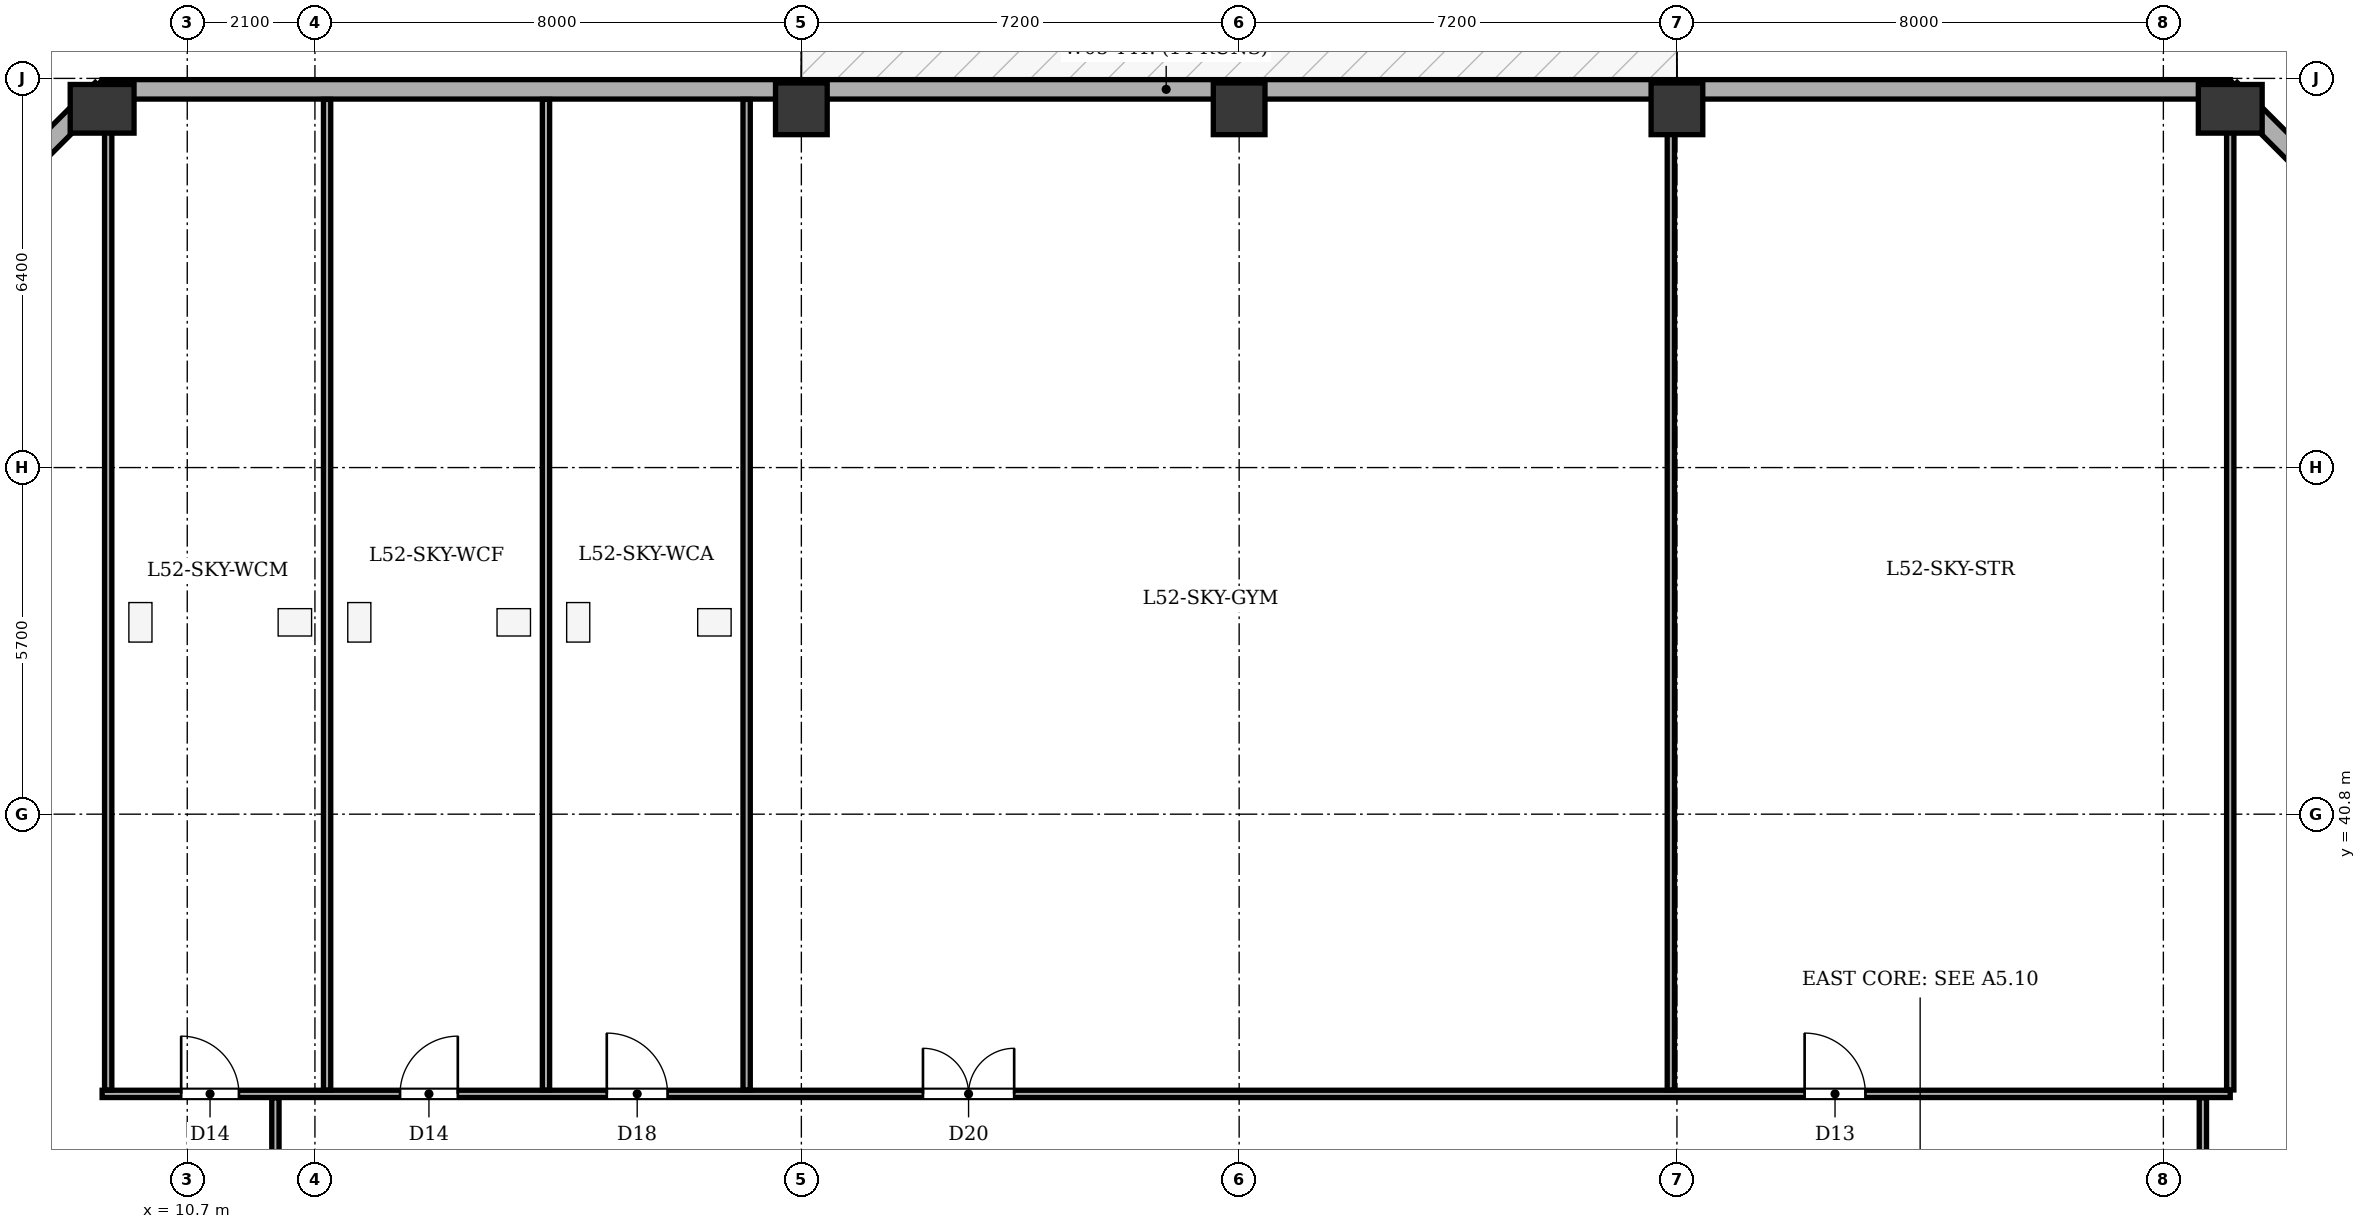
"""IFC4 building model, lengths in metres.
Left out: names, types, materials, properties, quantities, classifications, styles, units other than length and angle.
Written with IfcOpenShell. Run it as: python <this file> out.ifc"""

import sys

from ifc_helpers import new_model, si_unit, direction, frame, frame_2d, origin, origin_2d, place, context, subcontext, project, spatial, rectangle, extrude, element, fill, save


model = new_model("IFC4")
c1 = context("Model", 3, precision=1e-05, world=origin(), true_north=direction((0.0, 1.0)))
c2 = subcontext(c1, "Body", "Model", "MODEL_VIEW")
j1 = project(units=[si_unit("LENGTHUNIT", "METRE"), si_unit("PLANEANGLEUNIT", "RADIAN")], contexts=[c1])
p1 = place(None, origin())
s1 = spatial("IfcSite", under=j1, at=p1, CompositionType="ELEMENT")
p2 = place(p1, origin())
s2 = spatial("IfcBuilding", under=s1, at=p2, CompositionType="ELEMENT")
p3 = place(p2, frame((0.0, 0.0, 202.7)))
s3 = spatial("IfcBuildingStorey", under=s2, at=p3, CompositionType="ELEMENT", Elevation=202.7)
p4 = place(p3, frame((9.3, 52.4, 0.0), z_axis=(0.0, 0.0, 1.0), x_axis=(1.0, 0.0, 0.0)))
e1 = element("IfcColumn", 1, at=p4, inside=s3, PredefinedType="COLUMN", context=c2, shape_type="SweptSolid", body=[
    extrude(rectangle(XDim=0.8, YDim=1.05, at=origin_2d()), origin(), (0.0, 0.0, 1.0), 4.8),
])
for number, where, z_axis, x_axis in (
    (2, (20.8, 52.4, 0.0), (0.0, 0.0, 1.0), (1.0, 0.0, 0.0)),
    (3, (28.0, 52.4, 0.0), (0.0, 0.0, 1.0), (1.0, 0.0, 0.0)),
    (4, (35.2, 52.4, 0.0), (0.0, 0.0, 1.0), (1.0, 0.0, 0.0)),
):
    element("IfcColumn", number, at=place(p3, frame(where, z_axis=z_axis, x_axis=x_axis)), inside=s3, PredefinedType="COLUMN", context=c2, shape_type="SweptSolid", body=[
        extrude(rectangle(XDim=0.85, YDim=0.85, at=origin_2d()), origin(), (0.0, 0.0, 1.0), 4.8),
    ])
p5 = place(p3, frame((44.3, 52.4, 0.0), z_axis=(0.0, 0.0, 1.0), x_axis=(1.0, 0.0, 0.0)))
e5 = element("IfcColumn", 5, at=p5, inside=s3, PredefinedType="COLUMN", context=c2, shape_type="SweptSolid", body=[
    extrude(rectangle(XDim=0.8, YDim=1.05, at=origin_2d()), origin(), (0.0, 0.0, 1.0), 4.8),
])
p6 = place(p3, frame((4.48, 47.9, 0.0), z_axis=(0.0, 0.0, 1.0), x_axis=(0.707106781187, 0.707106781187, 0.0)))
e6 = element("IfcWall", 6, at=p6, inside=s3, PredefinedType="STANDARD", context=c2, shape_type="SweptSolid", body=[
    extrude(rectangle(XDim=6.817, YDim=0.32, at=frame_2d((3.408, 0.0))), origin(), (0.0, 0.0, 1.0), 3.735),
])
p7 = place(p3, frame((9.3, 52.72, 0.0), z_axis=(0.0, 0.0, 1.0), x_axis=(1.0, 0.0, 0.0)))
e7 = element("IfcWall", 7, at=p7, inside=s3, PredefinedType="STANDARD", context=c2, shape_type="SweptSolid", body=[
    extrude(rectangle(XDim=35.0, YDim=0.32, at=frame_2d((17.5, 0.0))), origin(), (0.0, 0.0, 1.0), 3.735),
])
p8 = place(p3, frame((44.3, 52.72, 0.0), z_axis=(0.0, 0.0, 1.0), x_axis=(0.707106781187, -0.707106781187, 0.0)))
e8 = element("IfcWall", 8, at=p8, inside=s3, PredefinedType="STANDARD", context=c2, shape_type="SweptSolid", body=[
    extrude(rectangle(XDim=6.817, YDim=0.32, at=frame_2d((3.408, 0.0))), origin(), (0.0, 0.0, 1.0), 3.735),
])
p9 = place(p3, frame((9.3, 36.2, 0.0), z_axis=(0.0, 0.0, 1.0), x_axis=(1.0, 0.0, 0.0)))
e9 = element("IfcWall", 9, at=p9, inside=s3, PredefinedType="PARTITIONING", context=c2, shape_type="SweptSolid", body=[
    extrude(rectangle(XDim=35.0, YDim=0.12, at=frame_2d((17.5, 0.0))), origin(), (0.0, 0.0, 1.0), 4.35),
])
p10 = place(p9, frame((1.3, 0.0, 0.0)))
e10 = element("IfcOpeningElement", 10, at=p10, cuts=e9, PredefinedType="OPENING", context=c2, shape_type="SweptSolid", body=[
    extrude(rectangle(XDim=0.95, YDim=2.1, at=frame_2d((0.475, 1.05))), frame((0.0, 0.07, 0.0), z_axis=(0.0, -1.0, 0.0), x_axis=(1.0, 0.0, 0.0)), (0.0, 0.0, 1.0), 0.14),
])
p11 = place(p9, frame((4.9, 0.0, 0.0)))
e11 = element("IfcOpeningElement", 11, at=p11, cuts=e9, PredefinedType="OPENING", context=c2, shape_type="SweptSolid", body=[
    extrude(rectangle(XDim=0.95, YDim=2.1, at=frame_2d((0.475, 1.05))), frame((0.0, 0.07, 0.0), z_axis=(0.0, -1.0, 0.0), x_axis=(1.0, 0.0, 0.0)), (0.0, 0.0, 1.0), 0.14),
])
p12 = place(p9, frame((8.3, 0.0, 0.0)))
e12 = element("IfcOpeningElement", 12, at=p12, cuts=e9, PredefinedType="OPENING", context=c2, shape_type="SweptSolid", body=[
    extrude(rectangle(XDim=1.0, YDim=2.1, at=frame_2d((0.5, 1.05))), frame((0.0, 0.07, 0.0), z_axis=(0.0, -1.0, 0.0), x_axis=(1.0, 0.0, 0.0)), (0.0, 0.0, 1.0), 0.14),
])
p13 = place(p9, frame((13.5, 0.0, 0.0)))
e13 = element("IfcOpeningElement", 13, at=p13, cuts=e9, PredefinedType="OPENING", context=c2, shape_type="SweptSolid", body=[
    extrude(rectangle(XDim=1.5, YDim=2.15, at=frame_2d((0.75, 1.075))), frame((0.0, 0.07, 0.0), z_axis=(0.0, -1.0, 0.0), x_axis=(1.0, 0.0, 0.0)), (0.0, 0.0, 1.0), 0.14),
])
p14 = place(p9, frame((28.0, 0.0, 0.0)))
e14 = element("IfcOpeningElement", 14, at=p14, cuts=e9, PredefinedType="OPENING", context=c2, shape_type="SweptSolid", body=[
    extrude(rectangle(XDim=1.0, YDim=2.1, at=frame_2d((0.5, 1.05))), frame((0.0, 0.07, 0.0), z_axis=(0.0, -1.0, 0.0), x_axis=(1.0, 0.0, 0.0)), (0.0, 0.0, 1.0), 0.14),
])
for number, where, z_axis, x_axis in (
    (15, (9.4, 36.265, 0.0), (0.0, 0.0, 1.0), (0.0, 1.0, 0.0)),
    (16, (13.0, 36.265, 0.0), (0.0, 0.0, 1.0), (0.0, 1.0, 0.0)),
):
    element("IfcWall", number, at=place(p3, frame(where, z_axis=z_axis, x_axis=x_axis)), inside=s3, PredefinedType="PARTITIONING", context=c2, shape_type="SweptSolid", body=[
        extrude(rectangle(XDim=16.29, YDim=0.12, at=frame_2d((8.145, 0.0))), origin(), (0.0, 0.0, 1.0), 4.35),
    ])
p15 = place(p3, frame((16.6, 36.265, 0.0), z_axis=(0.0, 0.0, 1.0), x_axis=(0.0, 1.0, 0.0)))
e17 = element("IfcWall", 17, at=p15, inside=s3, PredefinedType="PARTITIONING", context=c2, shape_type="SweptSolid", body=[
    extrude(rectangle(XDim=16.29, YDim=0.12, at=frame_2d((8.145, 0.0))), origin(), (0.0, 0.0, 1.0), 3.785),
])
for number, where, z_axis, x_axis in (
    (18, (19.9, 36.265, 0.0), (0.0, 0.0, 1.0), (0.0, 1.0, 0.0)),
    (19, (44.3, 36.265, 0.0), (0.0, 0.0, 1.0), (0.0, 1.0, 0.0)),
):
    element("IfcWall", number, at=place(p3, frame(where, z_axis=z_axis, x_axis=x_axis)), inside=s3, PredefinedType="PARTITIONING", context=c2, shape_type="SweptSolid", body=[
        extrude(rectangle(XDim=16.29, YDim=0.12, at=frame_2d((8.145, 0.0))), origin(), (0.0, 0.0, 1.0), 4.35),
    ])
p16 = place(p3, frame((35.1, 36.265, 0.0), z_axis=(0.0, 0.0, 1.0), x_axis=(0.0, 1.0, 0.0)))
e20 = element("IfcWall", 20, at=p16, inside=s3, PredefinedType="PARTITIONING", context=c2, shape_type="SweptSolid", body=[
    extrude(rectangle(XDim=16.29, YDim=0.12, at=frame_2d((8.145, 0.0))), origin(), (0.0, 0.0, 1.0), 3.535),
])
p17 = place(p3, frame((12.15, 18.465, 0.0), z_axis=(0.0, 0.0, 1.0), x_axis=(0.0, 1.0, 0.0)))
e21 = element("IfcWall", 21, at=p17, inside=s3, PredefinedType="PARTITIONING", context=c2, shape_type="SweptSolid", body=[
    extrude(rectangle(XDim=17.67, YDim=0.12, at=frame_2d((8.835, 0.0))), origin(), (0.0, 0.0, 1.0), 4.35),
])
p18 = place(p17, frame((0.385, 0.0, 0.0)))
e22 = element("IfcOpeningElement", 22, at=p18, cuts=e21, PredefinedType="OPENING", context=c2, shape_type="SweptSolid", body=[
    extrude(rectangle(XDim=1.1, YDim=2.15, at=frame_2d((0.55, 1.075))), frame((0.0, 0.07, 0.0), z_axis=(0.0, -1.0, 0.0), x_axis=(1.0, 0.0, 0.0)), (0.0, 0.0, 1.0), 0.14),
])
p19 = place(p3, frame((43.85, 18.465, 0.0), z_axis=(0.0, 0.0, 1.0), x_axis=(0.0, 1.0, 0.0)))
e23 = element("IfcWall", 23, at=p19, inside=s3, PredefinedType="PARTITIONING", context=c2, shape_type="SweptSolid", body=[
    extrude(rectangle(XDim=17.67, YDim=0.12, at=frame_2d((8.835, 0.0))), origin(), (0.0, 0.0, 1.0), 4.35),
])
p20 = place(p19, frame((0.385, 0.0, 0.0)))
e24 = element("IfcOpeningElement", 24, at=p20, cuts=e23, PredefinedType="OPENING", context=c2, shape_type="SweptSolid", body=[
    extrude(rectangle(XDim=1.1, YDim=2.15, at=frame_2d((0.55, 1.075))), frame((0.0, 0.07, 0.0), z_axis=(0.0, -1.0, 0.0), x_axis=(1.0, 0.0, 0.0)), (0.0, 0.0, 1.0), 0.14),
])
p21 = place(p10, origin())
e25 = element("IfcDoor", 25, at=p21, inside=s3, OperationType="SINGLE_SWING_LEFT", PredefinedType="DOOR", context=c2, shape_type="SweptSolid", body=[
    extrude(rectangle(XDim=0.95, YDim=2.1, at=frame_2d((0.475, 1.05))), frame((0.0, 0.025, 0.0), z_axis=(0.0, -1.0, 0.0), x_axis=(1.0, 0.0, 0.0)), (0.0, 0.0, 1.0), 0.05),
])
fill(e10, e25)
p22 = place(p11, origin())
e26 = element("IfcDoor", 26, at=p22, inside=s3, OperationType="SINGLE_SWING_RIGHT", PredefinedType="DOOR", context=c2, shape_type="SweptSolid", body=[
    extrude(rectangle(XDim=0.95, YDim=2.1, at=frame_2d((0.475, 1.05))), frame((0.0, 0.025, 0.0), z_axis=(0.0, -1.0, 0.0), x_axis=(1.0, 0.0, 0.0)), (0.0, 0.0, 1.0), 0.05),
])
fill(e11, e26)
p23 = place(p12, origin())
e27 = element("IfcDoor", 27, at=p23, inside=s3, OperationType="SINGLE_SWING_LEFT", PredefinedType="DOOR", context=c2, shape_type="SweptSolid", body=[
    extrude(rectangle(XDim=1.0, YDim=2.1, at=frame_2d((0.5, 1.05))), frame((0.0, 0.025, 0.0), z_axis=(0.0, -1.0, 0.0), x_axis=(1.0, 0.0, 0.0)), (0.0, 0.0, 1.0), 0.05),
])
fill(e12, e27)
p24 = place(p13, origin())
e28 = element("IfcDoor", 28, at=p24, inside=s3, OperationType="DOUBLE_DOOR_SINGLE_SWING", PredefinedType="DOOR", context=c2, shape_type="SweptSolid", body=[
    extrude(rectangle(XDim=1.5, YDim=2.15, at=frame_2d((0.75, 1.075))), frame((0.0, 0.025, 0.0), z_axis=(0.0, -1.0, 0.0), x_axis=(1.0, 0.0, 0.0)), (0.0, 0.0, 1.0), 0.05),
])
fill(e13, e28)
p25 = place(p14, origin())
e29 = element("IfcDoor", 29, at=p25, inside=s3, OperationType="SINGLE_SWING_LEFT", PredefinedType="DOOR", context=c2, shape_type="SweptSolid", body=[
    extrude(rectangle(XDim=1.0, YDim=2.1, at=frame_2d((0.5, 1.05))), frame((0.0, 0.025, 0.0), z_axis=(0.0, -1.0, 0.0), x_axis=(1.0, 0.0, 0.0)), (0.0, 0.0, 1.0), 0.05),
])
fill(e14, e29)
save(model, sys.argv[1])
